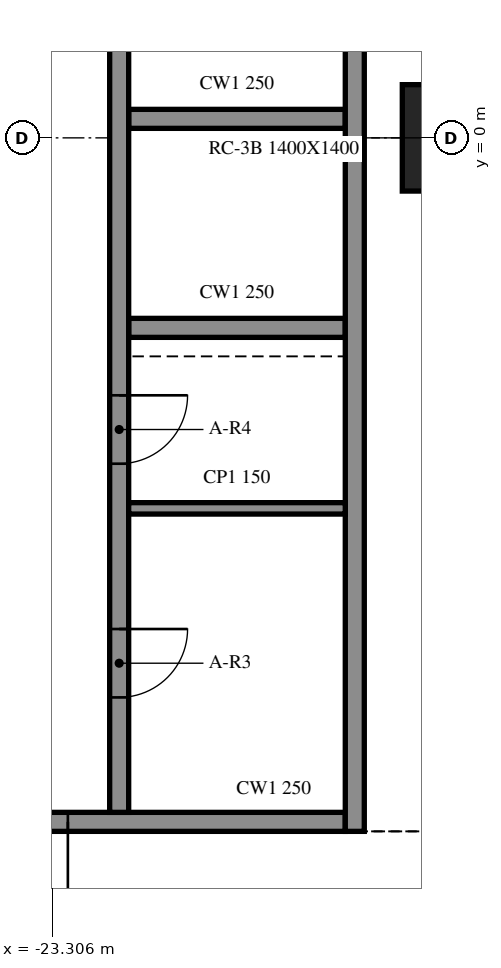
"""IFC4 building model, lengths in metres.
Left out: names, types, materials, properties, quantities, classifications, styles, units other than length and angle.
Written with IfcOpenShell. Run it as: python <this file> out.ifc"""

import sys

from ifc_helpers import new_model, si_unit, direction, frame, frame_2d, origin, origin_2d, place, context, subcontext, project, spatial, rectangle, extrude, element, fill, save


model = new_model("IFC4")
c1 = context("Model", 3, precision=1e-05, world=origin(), true_north=direction((0.0, 1.0)))
c2 = subcontext(c1, "Body", "Model", "MODEL_VIEW")
j1 = project(units=[si_unit("LENGTHUNIT", "METRE"), si_unit("PLANEANGLEUNIT", "RADIAN")], contexts=[c1])
p1 = place(None, origin())
s1 = spatial("IfcSite", under=j1, at=p1, CompositionType="ELEMENT")
p2 = place(p1, origin())
s2 = spatial("IfcBuilding", under=s1, at=p2, CompositionType="ELEMENT")
p3 = place(p2, frame((0.0, 0.0, 117.6)))
s3 = spatial("IfcBuildingStorey", under=s2, at=p3, CompositionType="ELEMENT", Elevation=117.6)
p4 = place(p3, frame((-18.0, 0.0, -0.55), z_axis=(0.0, 0.0, 1.0), x_axis=(1.0, 0.0, 0.0)))
e1 = element("IfcColumn", 1, at=p4, inside=s3, PredefinedType="COLUMN", context=c2, shape_type="SweptSolid", body=[
    extrude(rectangle(XDim=1.4, YDim=1.4, at=origin_2d()), origin(), (0.0, 0.0, 1.0), 4.61),
])
p5 = place(p3, frame((-19.325, -9.125, 0.0), z_axis=(0.0, 0.0, 1.0), x_axis=(0.0, 1.0, 0.0)))
e2 = element("IfcWall", 2, at=p5, inside=s3, PredefinedType="SOLIDWALL", context=c2, shape_type="SweptSolid", body=[
    extrude(rectangle(XDim=24.25, YDim=0.25, at=frame_2d((12.125, 0.0))), origin(), (0.0, 0.0, 1.0), 4.06),
])
p6 = place(p3, frame((-19.45, -9.0, 0.0), z_axis=(0.0, 0.0, 1.0), x_axis=(-1.0, 0.0, 0.0)))
e3 = element("IfcWall", 3, at=p6, inside=s3, PredefinedType="SOLIDWALL", context=c2, shape_type="SweptSolid", body=[
    extrude(rectangle(XDim=9.1, YDim=0.25, at=frame_2d((4.55, 0.0))), origin(), (0.0, 0.0, 1.0), 4.06),
])
p7 = place(p6, frame((3.65, 0.0, 0.0)))
e4 = element("IfcOpeningElement", 4, at=p7, cuts=e3, PredefinedType="OPENING", context=c2, shape_type="SweptSolid", body=[
    extrude(rectangle(XDim=1.8, YDim=2.1, at=frame_2d((0.9, 1.05))), frame((0.0, 0.135, 0.0), z_axis=(0.0, -1.0, 0.0), x_axis=(1.0, 0.0, 0.0)), (0.0, 0.0, 1.0), 0.27),
])
p8 = place(p3, frame((-22.425, 14.875, 0.0), z_axis=(0.0, 0.0, 1.0), x_axis=(0.0, -1.0, 0.0)))
e5 = element("IfcWall", 5, at=p8, inside=s3, PredefinedType="SOLIDWALL", context=c2, shape_type="SweptSolid", body=[
    extrude(rectangle(XDim=23.75, YDim=0.25, at=frame_2d((11.875, 0.0))), origin(), (0.0, 0.0, 1.0), 4.06),
])
p9 = place(p8, frame((21.337, 0.0, 0.0)))
e6 = element("IfcOpeningElement", 6, at=p9, cuts=e5, PredefinedType="OPENING", context=c2, shape_type="SweptSolid", body=[
    extrude(rectangle(XDim=0.9, YDim=2.1, at=frame_2d((0.45, 1.05))), frame((0.0, 0.135, 0.0), z_axis=(0.0, -1.0, 0.0), x_axis=(1.0, 0.0, 0.0)), (0.0, 0.0, 1.0), 0.27),
])
p10 = place(p8, frame((18.262, 0.0, 0.0)))
e7 = element("IfcOpeningElement", 7, at=p10, cuts=e5, PredefinedType="OPENING", context=c2, shape_type="SweptSolid", body=[
    extrude(rectangle(XDim=0.9, YDim=2.1, at=frame_2d((0.45, 1.05))), frame((0.0, 0.135, 0.0), z_axis=(0.0, -1.0, 0.0), x_axis=(1.0, 0.0, 0.0)), (0.0, 0.0, 1.0), 0.27),
])
p11 = place(p8, frame((4.387, 0.0, 0.0)))
e8 = element("IfcOpeningElement", 8, at=p11, cuts=e5, PredefinedType="OPENING", context=c2, shape_type="SweptSolid", body=[
    extrude(rectangle(XDim=0.9, YDim=2.1, at=frame_2d((0.45, 1.05))), frame((0.0, 0.135, 0.0), z_axis=(0.0, -1.0, 0.0), x_axis=(1.0, 0.0, 0.0)), (0.0, 0.0, 1.0), 0.27),
])
p12 = place(p8, frame((1.312, 0.0, 0.0)))
e9 = element("IfcOpeningElement", 9, at=p12, cuts=e5, PredefinedType="OPENING", context=c2, shape_type="SweptSolid", body=[
    extrude(rectangle(XDim=0.9, YDim=2.1, at=frame_2d((0.45, 1.05))), frame((0.0, 0.135, 0.0), z_axis=(0.0, -1.0, 0.0), x_axis=(1.0, 0.0, 0.0)), (0.0, 0.0, 1.0), 0.27),
])
for number, where, z_axis, x_axis in (
    (10, (-22.3, -2.5, 0.0), (0.0, 0.0, 1.0), (1.0, 0.0, 0.0)),
    (11, (-22.3, 0.25, 0.0), (0.0, 0.0, 1.0), (1.0, 0.0, 0.0)),
):
    element("IfcWall", number, at=place(p3, frame(where, z_axis=z_axis, x_axis=x_axis)), inside=s3, PredefinedType="SOLIDWALL", context=c2, shape_type="SweptSolid", body=[
        extrude(rectangle(XDim=2.85, YDim=0.25, at=frame_2d((1.425, 0.0))), origin(), (0.0, 0.0, 1.0), 4.06),
    ])
p13 = place(p3, frame((-22.3, -4.875, 0.0), z_axis=(0.0, 0.0, 1.0), x_axis=(1.0, 0.0, 0.0)))
e12 = element("IfcWall", 12, at=p13, inside=s3, PredefinedType="PARTITIONING", context=c2, shape_type="SweptSolid", body=[
    extrude(rectangle(XDim=2.85, YDim=0.15, at=frame_2d((1.425, 0.0))), origin(), (0.0, 0.0, 1.0), 4.06),
])
p14 = place(p7, origin())
e13 = element("IfcDoor", 13, at=p14, inside=s3, OperationType="DOUBLE_DOOR_SINGLE_SWING", PredefinedType="DOOR", context=c2, shape_type="SweptSolid", body=[
    extrude(rectangle(XDim=1.8, YDim=2.1, at=frame_2d((0.9, 1.05))), frame((0.0, 0.025, 0.0), z_axis=(0.0, -1.0, 0.0), x_axis=(1.0, 0.0, 0.0)), (0.0, 0.0, 1.0), 0.05),
])
fill(e4, e13)
p15 = place(p9, origin())
e14 = element("IfcDoor", 14, at=p15, inside=s3, OperationType="SINGLE_SWING_LEFT", PredefinedType="DOOR", context=c2, shape_type="SweptSolid", body=[
    extrude(rectangle(XDim=0.9, YDim=2.1, at=frame_2d((0.45, 1.05))), frame((0.0, 0.025, 0.0), z_axis=(0.0, -1.0, 0.0), x_axis=(1.0, 0.0, 0.0)), (0.0, 0.0, 1.0), 0.05),
])
fill(e6, e14)
p16 = place(p10, origin())
e15 = element("IfcDoor", 15, at=p16, inside=s3, OperationType="SINGLE_SWING_RIGHT", PredefinedType="DOOR", context=c2, shape_type="SweptSolid", body=[
    extrude(rectangle(XDim=0.9, YDim=2.1, at=frame_2d((0.45, 1.05))), frame((0.0, 0.025, 0.0), z_axis=(0.0, -1.0, 0.0), x_axis=(1.0, 0.0, 0.0)), (0.0, 0.0, 1.0), 0.05),
])
fill(e7, e15)
save(model, sys.argv[1])
